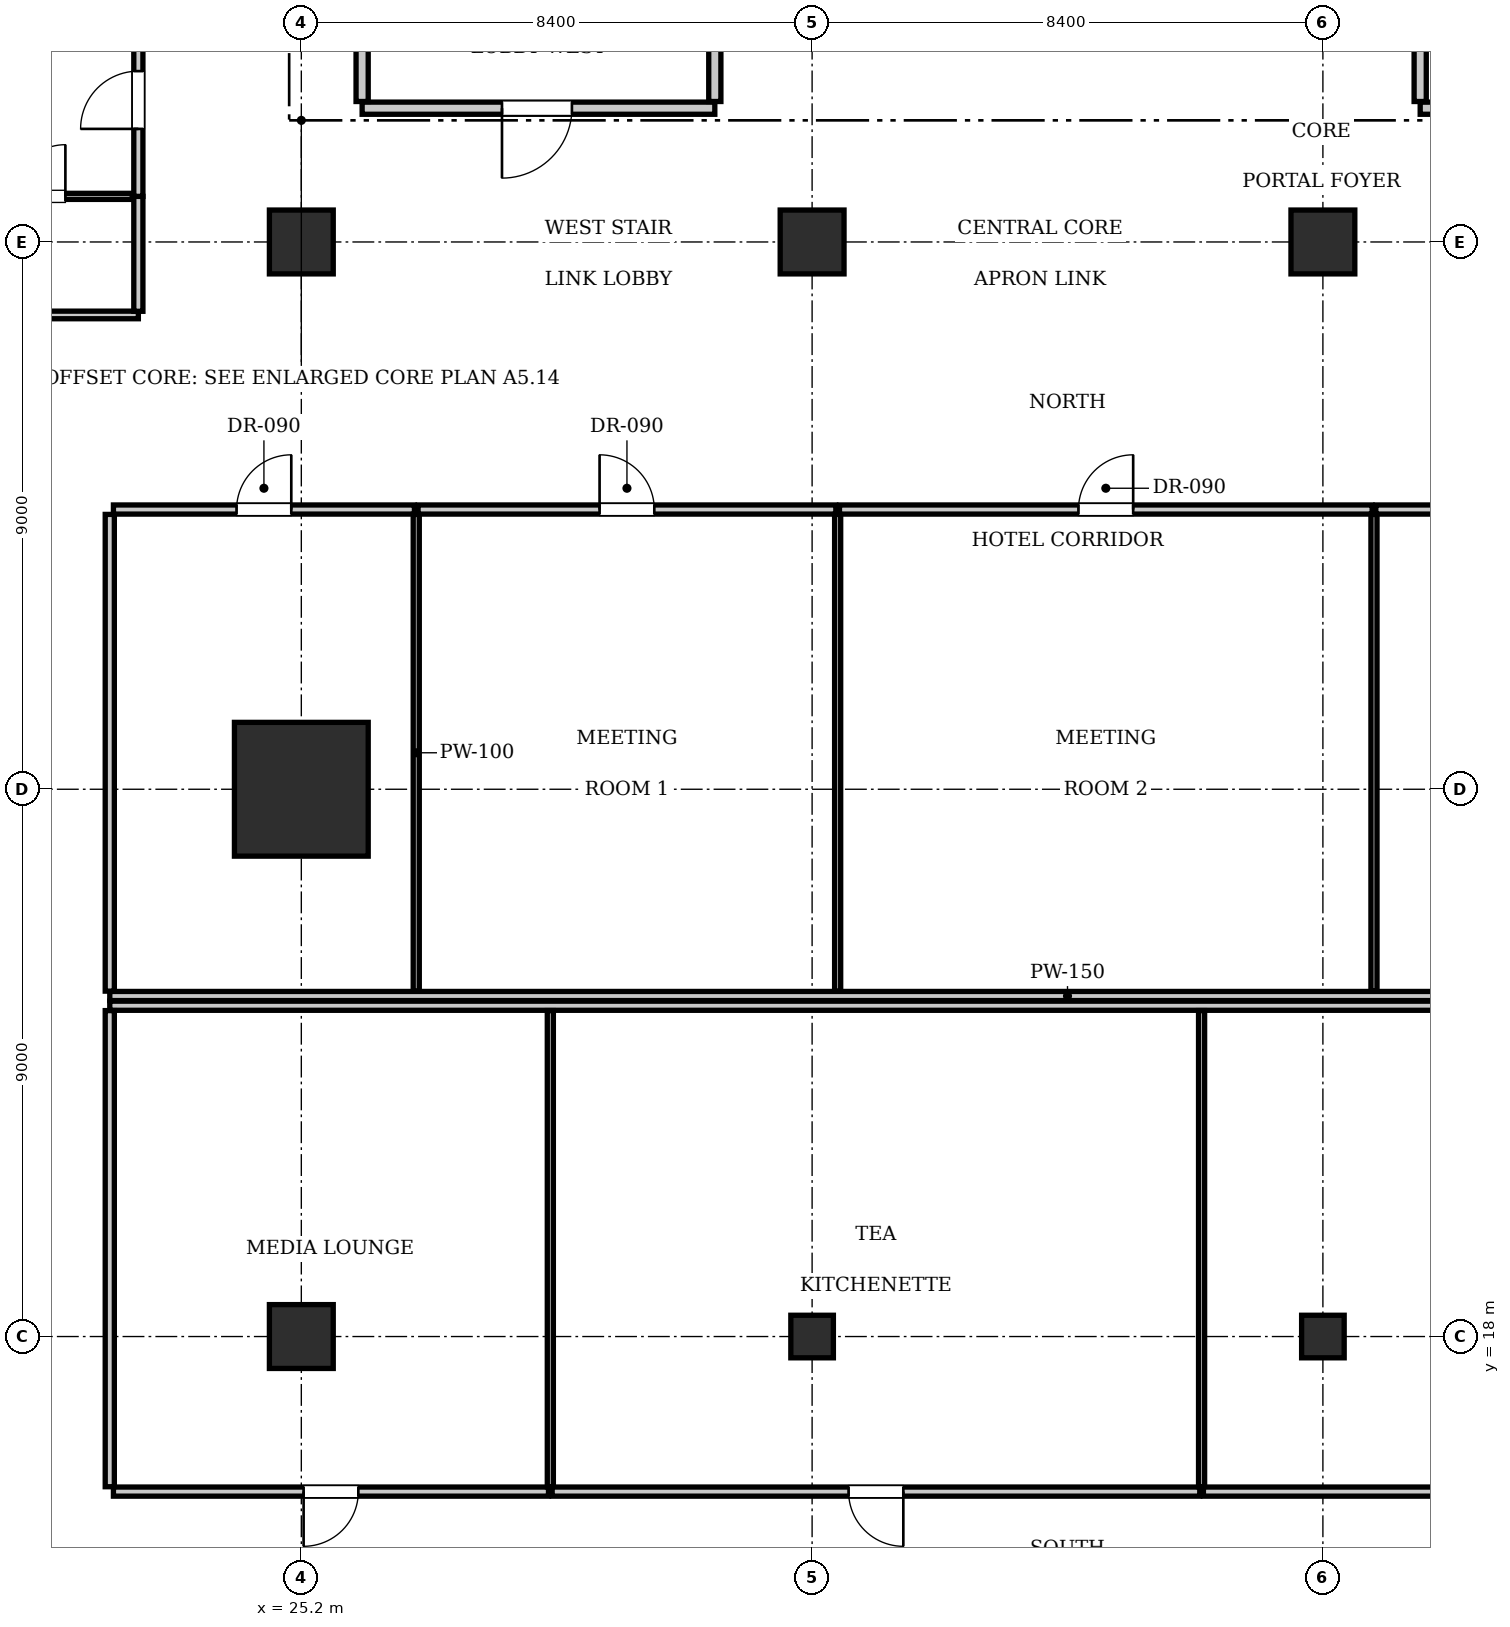
"""IFC4 building model, lengths in metres.
Left out: names, types, materials, properties, quantities, classifications, styles, units other than length and angle.
Written with IfcOpenShell. Run it as: python <this file> out.ifc"""

import sys

from ifc_helpers import new_model, si_unit, direction, frame, frame_2d, origin, origin_2d, place, context, subcontext, project, spatial, rectangle, i_section, extrude, element, fill, save


model = new_model("IFC4")
c1 = context("Model", 3, precision=1e-05, world=origin(), true_north=direction((0.0, 1.0)))
c2 = subcontext(c1, "Body", "Model", "MODEL_VIEW")
j1 = project(units=[si_unit("LENGTHUNIT", "METRE"), si_unit("PLANEANGLEUNIT", "RADIAN")], contexts=[c1])
p1 = place(None, origin())
s1 = spatial("IfcSite", under=j1, at=p1, CompositionType="ELEMENT")
p2 = place(p1, origin())
s2 = spatial("IfcBuilding", under=s1, at=p2, CompositionType="ELEMENT")
p3 = place(p2, frame((0.0, 0.0, 80.85)))
s3 = spatial("IfcBuildingStorey", under=s2, at=p3, CompositionType="ELEMENT", Elevation=80.85)
p4 = place(p3, frame((25.2, 27.0, 0.0), z_axis=(0.0, 0.0, 1.0), x_axis=(1.0, 0.0, 0.0)))
e1 = element("IfcColumn", 1, at=p4, inside=s3, PredefinedType="COLUMN", context=c2, shape_type="SweptSolid", body=[
    extrude(rectangle(XDim=2.2, YDim=2.2, at=origin_2d()), origin(), (0.0, 0.0, 1.0), 3.85),
])
for number, where, z_axis, x_axis in (
    (2, (25.2, 36.0, 0.0), (0.0, 0.0, 1.0), (1.0, 0.0, 0.0)),
    (3, (33.6, 36.0, 0.0), (0.0, 0.0, 1.0), (1.0, 0.0, 0.0)),
    (4, (42.0, 36.0, 0.0), (0.0, 0.0, 1.0), (1.0, 0.0, 0.0)),
    (5, (25.2, 18.0, 0.0), (0.0, 0.0, 1.0), (1.0, 0.0, 0.0)),
):
    element("IfcColumn", number, at=place(p3, frame(where, z_axis=z_axis, x_axis=x_axis)), inside=s3, PredefinedType="COLUMN", context=c2, shape_type="SweptSolid", body=[
        extrude(rectangle(XDim=1.05, YDim=1.05, at=origin_2d()), origin(), (0.0, 0.0, 1.0), 3.85),
    ])
for number, where, z_axis, x_axis in (
    (6, (33.6, 18.0, 0.0), (0.0, 0.0, 1.0), (1.0, 0.0, 0.0)),
    (7, (42.0, 18.0, 0.0), (0.0, 0.0, 1.0), (1.0, 0.0, 0.0)),
):
    element("IfcColumn", number, at=place(p3, frame(where, z_axis=z_axis, x_axis=x_axis)), inside=s3, PredefinedType="COLUMN", context=c2, shape_type="SweptSolid", body=[
        extrude(i_section(OverallWidth=0.7, OverallDepth=0.7, WebThickness=0.028, FlangeThickness=0.044, at=origin_2d()), origin(), (0.0, 0.0, 1.0), 3.85),
    ])
p5 = place(p3, frame((26.2, 38.2, 0.0), z_axis=(0.0, 0.0, 1.0), x_axis=(1.0, 0.0, 0.0)))
e8 = element("IfcWall", 8, at=p5, inside=s3, PredefinedType="PARTITIONING", context=c2, shape_type="SweptSolid", body=[
    extrude(rectangle(XDim=5.8, YDim=0.2, at=frame_2d((2.9, 0.0))), origin(), (0.0, 0.0, 1.0), 3.61),
])
p6 = place(p5, frame((2.3, 0.0, 0.0)))
e9 = element("IfcOpeningElement", 9, at=p6, cuts=e8, PredefinedType="OPENING", context=c2, shape_type="SweptSolid", body=[
    extrude(rectangle(XDim=1.15, YDim=2.15, at=frame_2d((0.575, 1.075))), frame((0.0, 0.11, 0.0), z_axis=(0.0, -1.0, 0.0), x_axis=(1.0, 0.0, 0.0)), (0.0, 0.0, 1.0), 0.22),
])
for number, where, z_axis, x_axis in (
    (10, (26.2, 38.31, 0.0), (0.0, 0.0, 1.0), (0.0, 1.0, 0.0)),
    (11, (32.0, 38.31, 0.0), (0.0, 0.0, 1.0), (0.0, 1.0, 0.0)),
):
    element("IfcWall", number, at=place(p3, frame(where, z_axis=z_axis, x_axis=x_axis)), inside=s3, PredefinedType="PARTITIONING", context=c2, shape_type="SweptSolid", body=[
        extrude(rectangle(XDim=3.07, YDim=0.2, at=frame_2d((1.535, 0.0))), origin(), (0.0, 0.0, 1.0), 3.61),
    ])
p7 = place(p3, frame((43.6, 38.2, 0.0), z_axis=(0.0, 0.0, 1.0), x_axis=(1.0, 0.0, 0.0)))
e12 = element("IfcWall", 12, at=p7, inside=s3, PredefinedType="PARTITIONING", context=c2, shape_type="SweptSolid", body=[
    extrude(rectangle(XDim=5.8, YDim=0.2, at=frame_2d((2.9, 0.0))), origin(), (0.0, 0.0, 1.0), 3.61),
])
p8 = place(p7, frame((2.3, 0.0, 0.0)))
e13 = element("IfcOpeningElement", 13, at=p8, cuts=e12, PredefinedType="OPENING", context=c2, shape_type="SweptSolid", body=[
    extrude(rectangle(XDim=1.15, YDim=2.15, at=frame_2d((0.575, 1.075))), frame((0.0, 0.11, 0.0), z_axis=(0.0, -1.0, 0.0), x_axis=(1.0, 0.0, 0.0)), (0.0, 0.0, 1.0), 0.22),
])
p9 = place(p3, frame((43.6, 38.31, 0.0), z_axis=(0.0, 0.0, 1.0), x_axis=(0.0, 1.0, 0.0)))
e14 = element("IfcWall", 14, at=p9, inside=s3, PredefinedType="PARTITIONING", context=c2, shape_type="SweptSolid", body=[
    extrude(rectangle(XDim=3.07, YDim=0.2, at=frame_2d((1.535, 0.0))), origin(), (0.0, 0.0, 1.0), 3.61),
])
p10 = place(p3, frame((22.05, 23.6, 0.0), z_axis=(0.0, 0.0, 1.0), x_axis=(1.0, 0.0, 0.0)))
e15 = element("IfcWall", 15, at=p10, inside=s3, PredefinedType="PARTITIONING", context=c2, shape_type="SweptSolid", body=[
    extrude(rectangle(XDim=31.5, YDim=0.15, at=frame_2d((15.75, 0.0))), origin(), (0.0, 0.0, 1.0), 3.61),
])
p11 = place(p3, frame((22.05, 23.68, 0.0), z_axis=(0.0, 0.0, 1.0), x_axis=(0.0, 1.0, 0.0)))
e16 = element("IfcWall", 16, at=p11, inside=s3, PredefinedType="PARTITIONING", context=c2, shape_type="SweptSolid", body=[
    extrude(rectangle(XDim=7.84, YDim=0.15, at=frame_2d((3.92, 0.0))), origin(), (0.0, 0.0, 1.0), 3.61),
])
p12 = place(p3, frame((22.11, 31.6, 0.0), z_axis=(0.0, 0.0, 1.0), x_axis=(1.0, 0.0, 0.0)))
e17 = element("IfcWall", 17, at=p12, inside=s3, PredefinedType="PARTITIONING", context=c2, shape_type="SweptSolid", body=[
    extrude(rectangle(XDim=4.95, YDim=0.15, at=frame_2d((2.475, 0.0))), origin(), (0.0, 0.0, 1.0), 3.61),
])
p13 = place(p12, frame((2.025, 0.0, 0.0)))
e18 = element("IfcOpeningElement", 18, at=p13, cuts=e17, PredefinedType="OPENING", context=c2, shape_type="SweptSolid", body=[
    extrude(rectangle(XDim=0.9, YDim=2.1, at=frame_2d((0.45, 1.05))), frame((0.0, 0.085, 0.0), z_axis=(0.0, -1.0, 0.0), x_axis=(1.0, 0.0, 0.0)), (0.0, 0.0, 1.0), 0.17),
])
p14 = place(p3, frame((27.09, 23.68, 0.0), z_axis=(0.0, 0.0, 1.0), x_axis=(0.0, 1.0, 0.0)))
e19 = element("IfcWall", 19, at=p14, inside=s3, PredefinedType="PARTITIONING", context=c2, shape_type="SweptSolid", body=[
    extrude(rectangle(XDim=7.84, YDim=0.1, at=frame_2d((3.92, 0.0))), origin(), (0.0, 0.0, 1.0), 3.61),
])
p15 = place(p3, frame((27.12, 31.6, 0.0), z_axis=(0.0, 0.0, 1.0), x_axis=(1.0, 0.0, 0.0)))
e20 = element("IfcWall", 20, at=p15, inside=s3, PredefinedType="PARTITIONING", context=c2, shape_type="SweptSolid", body=[
    extrude(rectangle(XDim=6.87, YDim=0.15, at=frame_2d((3.435, 0.0))), origin(), (0.0, 0.0, 1.0), 3.61),
])
p16 = place(p15, frame((2.985, 0.0, 0.0)))
e21 = element("IfcOpeningElement", 21, at=p16, cuts=e20, PredefinedType="OPENING", context=c2, shape_type="SweptSolid", body=[
    extrude(rectangle(XDim=0.9, YDim=2.1, at=frame_2d((0.45, 1.05))), frame((0.0, 0.085, 0.0), z_axis=(0.0, -1.0, 0.0), x_axis=(1.0, 0.0, 0.0)), (0.0, 0.0, 1.0), 0.17),
])
p17 = place(p3, frame((34.02, 23.68, 0.0), z_axis=(0.0, 0.0, 1.0), x_axis=(0.0, 1.0, 0.0)))
e22 = element("IfcWall", 22, at=p17, inside=s3, PredefinedType="PARTITIONING", context=c2, shape_type="SweptSolid", body=[
    extrude(rectangle(XDim=7.84, YDim=0.1, at=frame_2d((3.92, 0.0))), origin(), (0.0, 0.0, 1.0), 3.61),
])
p18 = place(p3, frame((34.05, 31.6, 0.0), z_axis=(0.0, 0.0, 1.0), x_axis=(1.0, 0.0, 0.0)))
e23 = element("IfcWall", 23, at=p18, inside=s3, PredefinedType="PARTITIONING", context=c2, shape_type="SweptSolid", body=[
    extrude(rectangle(XDim=8.76, YDim=0.15, at=frame_2d((4.38, 0.0))), origin(), (0.0, 0.0, 1.0), 3.61),
])
p19 = place(p18, frame((3.93, 0.0, 0.0)))
e24 = element("IfcOpeningElement", 24, at=p19, cuts=e23, PredefinedType="OPENING", context=c2, shape_type="SweptSolid", body=[
    extrude(rectangle(XDim=0.9, YDim=2.1, at=frame_2d((0.45, 1.05))), frame((0.0, 0.085, 0.0), z_axis=(0.0, -1.0, 0.0), x_axis=(1.0, 0.0, 0.0)), (0.0, 0.0, 1.0), 0.17),
])
p20 = place(p3, frame((42.84, 23.68, 0.0), z_axis=(0.0, 0.0, 1.0), x_axis=(0.0, 1.0, 0.0)))
e25 = element("IfcWall", 25, at=p20, inside=s3, PredefinedType="PARTITIONING", context=c2, shape_type="SweptSolid", body=[
    extrude(rectangle(XDim=7.84, YDim=0.1, at=frame_2d((3.92, 0.0))), origin(), (0.0, 0.0, 1.0), 3.61),
])
p21 = place(p3, frame((42.87, 31.6, 0.0), z_axis=(0.0, 0.0, 1.0), x_axis=(1.0, 0.0, 0.0)))
e26 = element("IfcWall", 26, at=p21, inside=s3, PredefinedType="PARTITIONING", context=c2, shape_type="SweptSolid", body=[
    extrude(rectangle(XDim=10.62, YDim=0.15, at=frame_2d((5.31, 0.0))), origin(), (0.0, 0.0, 1.0), 3.61),
])
p22 = place(p21, frame((4.86, 0.0, 0.0)))
e27 = element("IfcOpeningElement", 27, at=p22, cuts=e26, PredefinedType="OPENING", context=c2, shape_type="SweptSolid", body=[
    extrude(rectangle(XDim=0.9, YDim=2.1, at=frame_2d((0.45, 1.05))), frame((0.0, 0.085, 0.0), z_axis=(0.0, -1.0, 0.0), x_axis=(1.0, 0.0, 0.0)), (0.0, 0.0, 1.0), 0.17),
])
p23 = place(p3, frame((22.05, 23.44, 0.0), z_axis=(0.0, 0.0, 1.0), x_axis=(1.0, 0.0, 0.0)))
e28 = element("IfcWall", 28, at=p23, inside=s3, PredefinedType="PARTITIONING", context=c2, shape_type="SweptSolid", body=[
    extrude(rectangle(XDim=31.5, YDim=0.15, at=frame_2d((15.75, 0.0))), origin(), (0.0, 0.0, 1.0), 3.61),
])
p24 = place(p3, frame((22.05, 15.53, 0.0), z_axis=(0.0, 0.0, 1.0), x_axis=(0.0, 1.0, 0.0)))
e29 = element("IfcWall", 29, at=p24, inside=s3, PredefinedType="PARTITIONING", context=c2, shape_type="SweptSolid", body=[
    extrude(rectangle(XDim=7.83, YDim=0.15, at=frame_2d((3.915, 0.0))), origin(), (0.0, 0.0, 1.0), 3.61),
])
p25 = place(p3, frame((22.11, 15.45, 0.0), z_axis=(0.0, 0.0, 1.0), x_axis=(1.0, 0.0, 0.0)))
e30 = element("IfcWall", 30, at=p25, inside=s3, PredefinedType="PARTITIONING", context=c2, shape_type="SweptSolid", body=[
    extrude(rectangle(XDim=7.155, YDim=0.15, at=frame_2d((3.577, 0.0))), origin(), (0.0, 0.0, 1.0), 3.61),
])
p26 = place(p25, frame((3.127, 0.0, 0.0)))
e31 = element("IfcOpeningElement", 31, at=p26, cuts=e30, PredefinedType="OPENING", context=c2, shape_type="SweptSolid", body=[
    extrude(rectangle(XDim=0.9, YDim=2.1, at=frame_2d((0.45, 1.05))), frame((0.0, 0.085, 0.0), z_axis=(0.0, -1.0, 0.0), x_axis=(1.0, 0.0, 0.0)), (0.0, 0.0, 1.0), 0.17),
])
p27 = place(p3, frame((29.295, 15.53, 0.0), z_axis=(0.0, 0.0, 1.0), x_axis=(0.0, 1.0, 0.0)))
e32 = element("IfcWall", 32, at=p27, inside=s3, PredefinedType="PARTITIONING", context=c2, shape_type="SweptSolid", body=[
    extrude(rectangle(XDim=7.83, YDim=0.1, at=frame_2d((3.915, 0.0))), origin(), (0.0, 0.0, 1.0), 3.263),
])
p28 = place(p3, frame((29.325, 15.45, 0.0), z_axis=(0.0, 0.0, 1.0), x_axis=(1.0, 0.0, 0.0)))
e33 = element("IfcWall", 33, at=p28, inside=s3, PredefinedType="PARTITIONING", context=c2, shape_type="SweptSolid", body=[
    extrude(rectangle(XDim=10.65, YDim=0.15, at=frame_2d((5.325, 0.0))), origin(), (0.0, 0.0, 1.0), 3.61),
])
p29 = place(p28, frame((4.875, 0.0, 0.0)))
e34 = element("IfcOpeningElement", 34, at=p29, cuts=e33, PredefinedType="OPENING", context=c2, shape_type="SweptSolid", body=[
    extrude(rectangle(XDim=0.9, YDim=2.1, at=frame_2d((0.45, 1.05))), frame((0.0, 0.085, 0.0), z_axis=(0.0, -1.0, 0.0), x_axis=(1.0, 0.0, 0.0)), (0.0, 0.0, 1.0), 0.17),
])
p30 = place(p3, frame((40.005, 15.53, 0.0), z_axis=(0.0, 0.0, 1.0), x_axis=(0.0, 1.0, 0.0)))
e35 = element("IfcWall", 35, at=p30, inside=s3, PredefinedType="PARTITIONING", context=c2, shape_type="SweptSolid", body=[
    extrude(rectangle(XDim=7.83, YDim=0.1, at=frame_2d((3.915, 0.0))), origin(), (0.0, 0.0, 1.0), 3.61),
])
p31 = place(p3, frame((40.035, 15.45, 0.0), z_axis=(0.0, 0.0, 1.0), x_axis=(1.0, 0.0, 0.0)))
e36 = element("IfcWall", 36, at=p31, inside=s3, PredefinedType="PARTITIONING", context=c2, shape_type="SweptSolid", body=[
    extrude(rectangle(XDim=13.455, YDim=0.15, at=frame_2d((6.728, 0.0))), origin(), (0.0, 0.0, 1.0), 3.61),
])
p32 = place(p31, frame((6.278, 0.0, 0.0)))
e37 = element("IfcOpeningElement", 37, at=p32, cuts=e36, PredefinedType="OPENING", context=c2, shape_type="SweptSolid", body=[
    extrude(rectangle(XDim=0.9, YDim=2.1, at=frame_2d((0.45, 1.05))), frame((0.0, 0.085, 0.0), z_axis=(0.0, -1.0, 0.0), x_axis=(1.0, 0.0, 0.0)), (0.0, 0.0, 1.0), 0.17),
])
p33 = place(p3, frame((10.9, 34.8, 0.0), z_axis=(0.0, 0.0, 1.0), x_axis=(1.0, 0.0, 0.0)))
e38 = element("IfcWall", 38, at=p33, inside=s3, PredefinedType="PARTITIONING", context=c2, shape_type="SweptSolid", body=[
    extrude(rectangle(XDim=11.62, YDim=0.125, at=frame_2d((5.81, 0.0))), origin(), (0.0, 0.0, 1.0), 3.61),
])
p34 = place(p3, frame((22.52, 34.86, 0.0), z_axis=(0.0, 0.0, 1.0), x_axis=(0.0, 1.0, 0.0)))
e39 = element("IfcWall", 39, at=p34, inside=s3, PredefinedType="PARTITIONING", context=c2, shape_type="SweptSolid", body=[
    extrude(rectangle(XDim=1.89, YDim=0.15, at=frame_2d((0.945, 0.0))), origin(), (0.0, 0.0, 1.0), 3.61),
])
p35 = place(p3, frame((22.52, 36.75, 0.0), z_axis=(0.0, 0.0, 1.0), x_axis=(0.0, 1.0, 0.0)))
e40 = element("IfcWall", 40, at=p35, inside=s3, PredefinedType="PARTITIONING", context=c2, shape_type="SweptSolid", body=[
    extrude(rectangle(XDim=3.169, YDim=0.15, at=frame_2d((1.584, 0.0))), origin(), (0.0, 0.0, 1.0), 3.61),
])
p36 = place(p35, frame((1.11, 0.0, 0.0)))
e41 = element("IfcOpeningElement", 41, at=p36, cuts=e40, PredefinedType="OPENING", context=c2, shape_type="SweptSolid", body=[
    extrude(rectangle(XDim=0.95, YDim=2.15, at=frame_2d((0.475, 1.075))), frame((0.0, 0.085, 0.0), z_axis=(0.0, -1.0, 0.0), x_axis=(1.0, 0.0, 0.0)), (0.0, 0.0, 1.0), 0.17),
])
p37 = place(p3, frame((20.12, 36.75, 0.0), z_axis=(0.0, 0.0, 1.0), x_axis=(1.0, 0.0, 0.0)))
e42 = element("IfcWall", 42, at=p37, inside=s3, PredefinedType="PARTITIONING", context=c2, shape_type="SweptSolid", body=[
    extrude(rectangle(XDim=2.3, YDim=0.1, at=frame_2d((1.15, 0.0))), origin(), (0.0, 0.0, 1.0), 3.61),
])
p38 = place(p37, frame((0.35, 0.0, 0.0)))
e43 = element("IfcOpeningElement", 43, at=p38, cuts=e42, PredefinedType="OPENING", context=c2, shape_type="SweptSolid", body=[
    extrude(rectangle(XDim=0.85, YDim=2.1, at=frame_2d((0.425, 1.05))), frame((0.0, 0.06, 0.0), z_axis=(0.0, -1.0, 0.0), x_axis=(1.0, 0.0, 0.0)), (0.0, 0.0, 1.0), 0.12),
])
p39 = place(p6, frame((1.15, 0.0, 0.0), z_axis=(0.0, 0.0, 1.0), x_axis=(-1.0, 0.0, 0.0)))
e44 = element("IfcDoor", 44, at=p39, inside=s3, OperationType="SINGLE_SWING_RIGHT", PredefinedType="DOOR", context=c2, shape_type="SweptSolid", body=[
    extrude(rectangle(XDim=1.15, YDim=2.15, at=frame_2d((0.575, 1.075))), frame((0.0, 0.025, 0.0), z_axis=(0.0, -1.0, 0.0), x_axis=(1.0, 0.0, 0.0)), (0.0, 0.0, 1.0), 0.05),
])
fill(e9, e44)
p40 = place(p13, origin())
e45 = element("IfcDoor", 45, at=p40, inside=s3, OperationType="SINGLE_SWING_RIGHT", PredefinedType="DOOR", context=c2, shape_type="SweptSolid", body=[
    extrude(rectangle(XDim=0.9, YDim=2.1, at=frame_2d((0.45, 1.05))), frame((0.0, 0.025, 0.0), z_axis=(0.0, -1.0, 0.0), x_axis=(1.0, 0.0, 0.0)), (0.0, 0.0, 1.0), 0.05),
])
fill(e18, e45)
p41 = place(p16, origin())
e46 = element("IfcDoor", 46, at=p41, inside=s3, OperationType="SINGLE_SWING_LEFT", PredefinedType="DOOR", context=c2, shape_type="SweptSolid", body=[
    extrude(rectangle(XDim=0.9, YDim=2.1, at=frame_2d((0.45, 1.05))), frame((0.0, 0.025, 0.0), z_axis=(0.0, -1.0, 0.0), x_axis=(1.0, 0.0, 0.0)), (0.0, 0.0, 1.0), 0.05),
])
fill(e21, e46)
p42 = place(p19, origin())
e47 = element("IfcDoor", 47, at=p42, inside=s3, OperationType="SINGLE_SWING_RIGHT", PredefinedType="DOOR", context=c2, shape_type="SweptSolid", body=[
    extrude(rectangle(XDim=0.9, YDim=2.1, at=frame_2d((0.45, 1.05))), frame((0.0, 0.025, 0.0), z_axis=(0.0, -1.0, 0.0), x_axis=(1.0, 0.0, 0.0)), (0.0, 0.0, 1.0), 0.05),
])
fill(e24, e47)
p43 = place(p26, frame((0.9, 0.0, 0.0), z_axis=(0.0, 0.0, 1.0), x_axis=(-1.0, 0.0, 0.0)))
e48 = element("IfcDoor", 48, at=p43, inside=s3, OperationType="SINGLE_SWING_RIGHT", PredefinedType="DOOR", context=c2, shape_type="SweptSolid", body=[
    extrude(rectangle(XDim=0.9, YDim=2.1, at=frame_2d((0.45, 1.05))), frame((0.0, 0.025, 0.0), z_axis=(0.0, -1.0, 0.0), x_axis=(1.0, 0.0, 0.0)), (0.0, 0.0, 1.0), 0.05),
])
fill(e31, e48)
p44 = place(p29, frame((0.9, 0.0, 0.0), z_axis=(0.0, 0.0, 1.0), x_axis=(-1.0, 0.0, 0.0)))
e49 = element("IfcDoor", 49, at=p44, inside=s3, OperationType="SINGLE_SWING_LEFT", PredefinedType="DOOR", context=c2, shape_type="SweptSolid", body=[
    extrude(rectangle(XDim=0.9, YDim=2.1, at=frame_2d((0.45, 1.05))), frame((0.0, 0.025, 0.0), z_axis=(0.0, -1.0, 0.0), x_axis=(1.0, 0.0, 0.0)), (0.0, 0.0, 1.0), 0.05),
])
fill(e34, e49)
p45 = place(p38, origin())
e50 = element("IfcDoor", 50, at=p45, inside=s3, OperationType="SINGLE_SWING_RIGHT", PredefinedType="DOOR", context=c2, shape_type="SweptSolid", body=[
    extrude(rectangle(XDim=0.85, YDim=2.1, at=frame_2d((0.425, 1.05))), frame((0.0, 0.025, 0.0), z_axis=(0.0, -1.0, 0.0), x_axis=(1.0, 0.0, 0.0)), (0.0, 0.0, 1.0), 0.05),
])
fill(e43, e50)
p46 = place(p36, origin())
e51 = element("IfcDoor", 51, at=p46, inside=s3, OperationType="SINGLE_SWING_LEFT", PredefinedType="DOOR", context=c2, shape_type="SweptSolid", body=[
    extrude(rectangle(XDim=0.95, YDim=2.15, at=frame_2d((0.475, 1.075))), frame((0.0, 0.025, 0.0), z_axis=(0.0, -1.0, 0.0), x_axis=(1.0, 0.0, 0.0)), (0.0, 0.0, 1.0), 0.05),
])
fill(e41, e51)
save(model, sys.argv[1])
